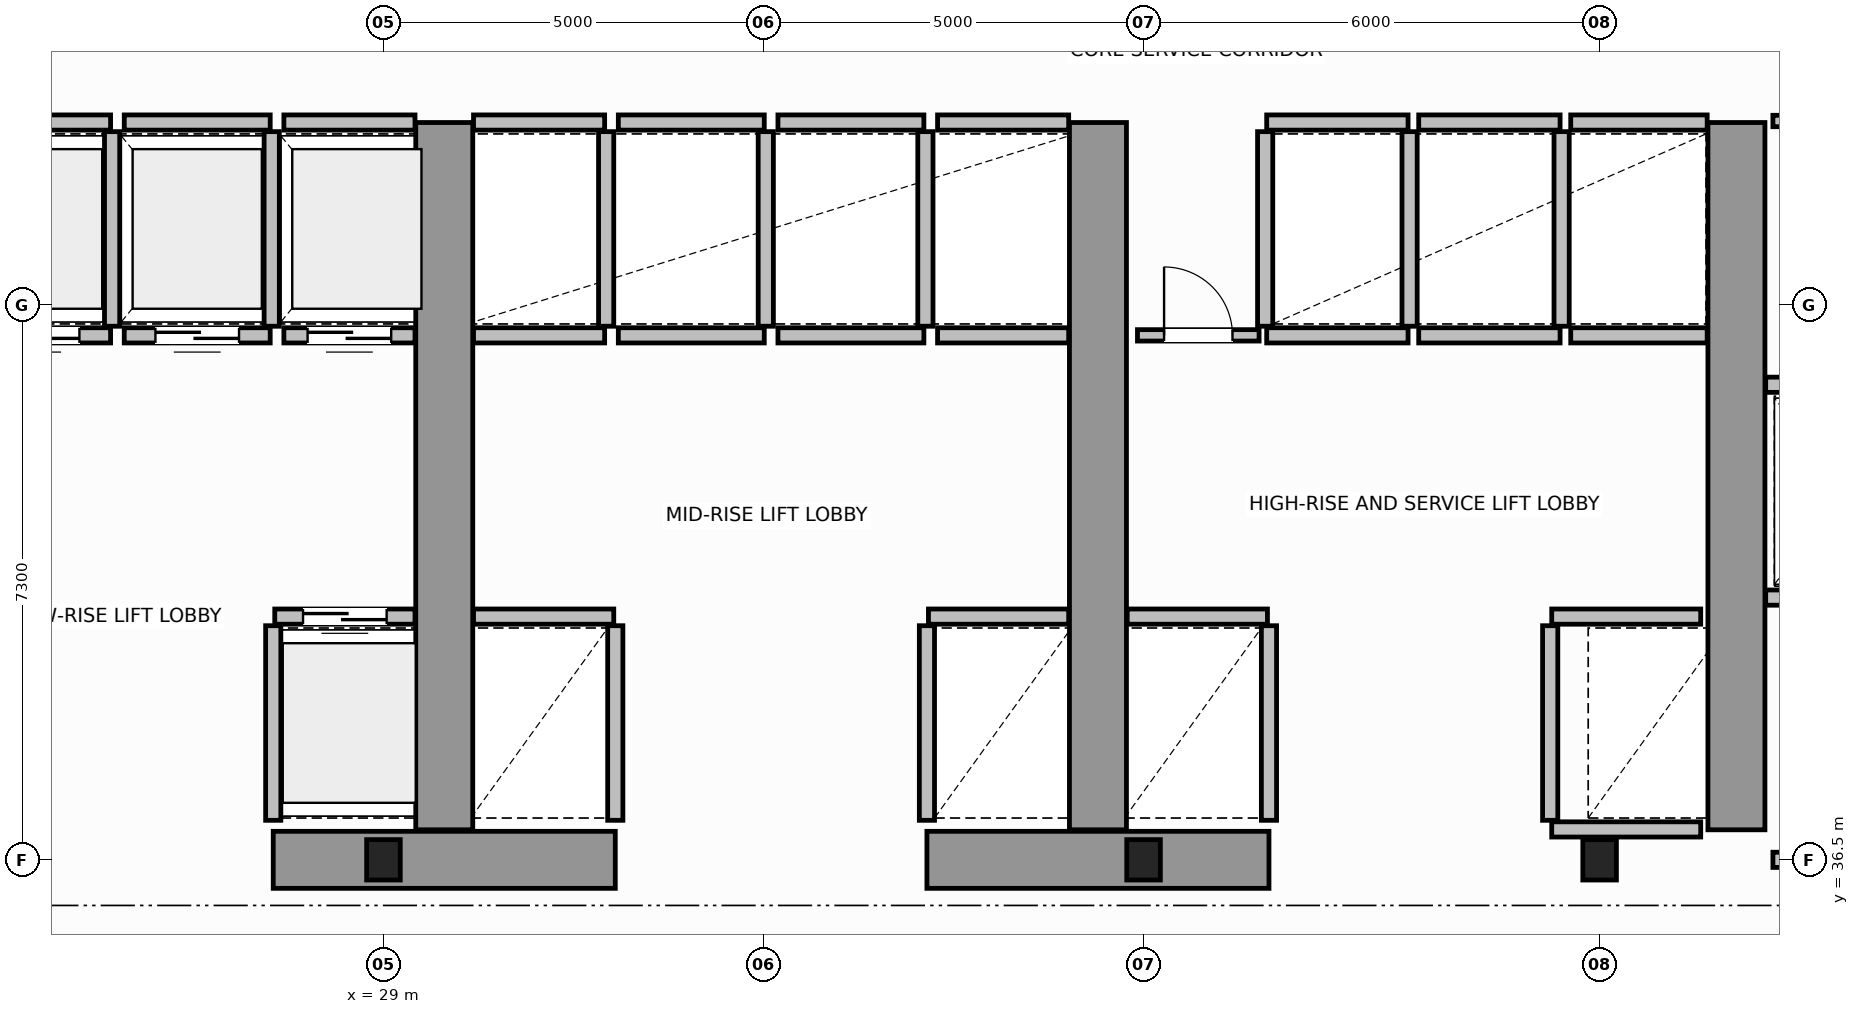
"""IFC4 building model, lengths in metres.
Left out: names, types, materials, properties, quantities, classifications, styles, units other than length and angle.
Written with IfcOpenShell. Run it as: python <this file> out.ifc"""

import sys

from ifc_helpers import new_model, si_unit, direction, frame, frame_2d, origin, origin_2d, place, context, subcontext, project, spatial, rectangle, i_section, extrude, source, transform, mapped, element, fill, save


model = new_model("IFC4")
c1 = context("Model", 3, precision=1e-05, world=origin(), true_north=direction((0.0, 1.0)))
c2 = subcontext(c1, "Body", "Model", "MODEL_VIEW")
j1 = project(units=[si_unit("LENGTHUNIT", "METRE"), si_unit("PLANEANGLEUNIT", "RADIAN")], contexts=[c1])
p1 = place(None, origin())
s1 = spatial("IfcSite", under=j1, at=p1, CompositionType="ELEMENT")
p2 = place(p1, origin())
s2 = spatial("IfcBuilding", under=s1, at=p2, CompositionType="ELEMENT")
p3 = place(p2, frame((0.0, 0.0, 88.2)))
s3 = spatial("IfcBuildingStorey", under=s2, at=p3, CompositionType="ELEMENT", Elevation=88.2)
m1 = source(origin(), c2, "Body", "SweptSolid", [
    extrude(i_section(OverallWidth=0.442, OverallDepth=0.531, WebThickness=0.065, FlangeThickness=0.076, FilletRadius=0.015, at=origin_2d()), origin(), (0.0, 0.0, 1.0), 3.8),
])
for number, where, z_axis, x_axis in (
    (1, (29.0, 36.5, 0.0), (0.0, 0.0, 1.0), (1.0, 0.0, 0.0)),
    (2, (39.0, 36.5, 0.0), (0.0, 0.0, 1.0), (1.0, 0.0, 0.0)),
    (3, (45.0, 36.5, 0.0), (0.0, 0.0, 1.0), (1.0, 0.0, 0.0)),
):
    element("IfcColumn", number, at=place(p3, frame(where, z_axis=z_axis, x_axis=x_axis)), inside=s3, PredefinedType="COLUMN", context=c2, shape_type="MappedRepresentation", body=[
        mapped(m1, transform((0.0, 0.0, 0.0), scale=1.0)),
    ])
for number, where, z_axis, x_axis in (
    (4, (27.55, 36.5, 0.0), (0.0, 0.0, 1.0), (1.0, 0.0, 0.0)),
    (5, (36.15, 36.5, 0.0), (0.0, 0.0, 1.0), (1.0, 0.0, 0.0)),
):
    element("IfcWall", number, at=place(p3, frame(where, z_axis=z_axis, x_axis=x_axis)), inside=s3, PredefinedType="SHEAR", context=c2, shape_type="SweptSolid", body=[
        extrude(rectangle(XDim=4.5, YDim=0.75, at=frame_2d((2.25, 0.0))), origin(), (0.0, 0.0, 1.0), 3.8),
    ])
for number, where, z_axis, x_axis in (
    (6, (29.8, 36.895, 0.0), (0.0, 0.0, 1.0), (0.0, 1.0, 0.0)),
    (7, (38.4, 36.895, 0.0), (0.0, 0.0, 1.0), (0.0, 1.0, 0.0)),
    (8, (46.8, 36.895, 0.0), (0.0, 0.0, 1.0), (0.0, 1.0, 0.0)),
):
    element("IfcWall", number, at=place(p3, frame(where, z_axis=z_axis, x_axis=x_axis)), inside=s3, PredefinedType="SHEAR", context=c2, shape_type="SweptSolid", body=[
        extrude(rectangle(XDim=9.305, YDim=0.75, at=frame_2d((4.652, 0.0))), origin(), (0.0, 0.0, 1.0), 3.8),
    ])
p4 = place(p3, frame((47.28, 36.5, 0.0), z_axis=(0.0, 0.0, 1.0), x_axis=(1.0, 0.0, 0.0)))
e9 = element("IfcWall", 9, at=p4, inside=s3, PredefinedType="SOLIDWALL", context=c2, shape_type="SweptSolid", body=[
    extrude(rectangle(XDim=2.47, YDim=0.2, at=frame_2d((1.235, 0.0))), origin(), (0.0, 0.0, 1.0), 2.37),
])
p5 = place(p4, frame((0.65, 0.0, 0.0)))
e10 = element("IfcOpeningElement", 10, at=p5, cuts=e9, PredefinedType="OPENING", context=c2, shape_type="SweptSolid", body=[
    extrude(rectangle(XDim=1.1, YDim=2.15, at=frame_2d((0.55, 1.075))), frame((0.0, 0.11, 0.0), z_axis=(0.0, -1.0, 0.0), x_axis=(1.0, 0.0, 0.0)), (0.0, 0.0, 1.0), 0.22),
])
p6 = place(p3, frame((27.57, 39.7, 0.0), z_axis=(0.0, 0.0, 1.0), x_axis=(1.0, 0.0, 0.0)))
e11 = element("IfcWall", 11, at=p6, inside=s3, PredefinedType="SOLIDWALL", context=c2, shape_type="SweptSolid", body=[
    extrude(rectangle(XDim=1.845, YDim=0.2, at=frame_2d((0.922, 0.0))), origin(), (0.0, 0.0, 1.0), 3.58),
])
p7 = place(p6, frame((0.372, 0.0, 0.0)))
e12 = element("IfcOpeningElement", 12, at=p7, cuts=e11, PredefinedType="OPENING", context=c2, shape_type="SweptSolid", body=[
    extrude(rectangle(XDim=1.1, YDim=2.15, at=frame_2d((0.55, 1.075))), frame((0.0, 0.11, 0.0), z_axis=(0.0, -1.0, 0.0), x_axis=(1.0, 0.0, 0.0)), (0.0, 0.0, 1.0), 0.22),
])
p8 = place(p3, frame((27.55, 37.02, 0.0), z_axis=(0.0, 0.0, 1.0), x_axis=(0.0, 1.0, 0.0)))
e13 = element("IfcWall", 13, at=p8, inside=s3, PredefinedType="SOLIDWALL", context=c2, shape_type="SweptSolid", body=[
    extrude(rectangle(XDim=2.56, YDim=0.2, at=frame_2d((1.28, 0.0))), origin(), (0.0, 0.0, 1.0), 3.58),
])
p9 = place(p3, frame((23.49, 43.4, 0.0), z_axis=(0.0, 0.0, 1.0), x_axis=(1.0, 0.0, 0.0)))
e14 = element("IfcWall", 14, at=p9, inside=s3, PredefinedType="SOLIDWALL", context=c2, shape_type="SweptSolid", body=[
    extrude(rectangle(XDim=1.92, YDim=0.2, at=frame_2d((0.96, 0.0))), origin(), (0.0, 0.0, 1.0), 3.58),
])
p10 = place(p9, frame((0.41, 0.0, 0.0)))
e15 = element("IfcOpeningElement", 15, at=p10, cuts=e14, PredefinedType="OPENING", context=c2, shape_type="SweptSolid", body=[
    extrude(rectangle(XDim=1.1, YDim=2.15, at=frame_2d((0.55, 1.075))), frame((0.0, 0.11, 0.0), z_axis=(0.0, -1.0, 0.0), x_axis=(1.0, 0.0, 0.0)), (0.0, 0.0, 1.0), 0.22),
])
p11 = place(p3, frame((23.49, 46.2, 0.0), z_axis=(0.0, 0.0, 1.0), x_axis=(1.0, 0.0, 0.0)))
e16 = element("IfcWall", 16, at=p11, inside=s3, PredefinedType="SOLIDWALL", context=c2, shape_type="SweptSolid", body=[
    extrude(rectangle(XDim=1.92, YDim=0.2, at=frame_2d((0.96, 0.0))), origin(), (0.0, 0.0, 1.0), 3.58),
])
p12 = place(p3, frame((25.43, 43.52, 0.0), z_axis=(0.0, 0.0, 1.0), x_axis=(0.0, 1.0, 0.0)))
e17 = element("IfcWall", 17, at=p12, inside=s3, PredefinedType="SOLIDWALL", context=c2, shape_type="SweptSolid", body=[
    extrude(rectangle(XDim=2.56, YDim=0.2, at=frame_2d((1.28, 0.0))), origin(), (0.0, 0.0, 1.0), 3.58),
])
p13 = place(p3, frame((25.59, 43.4, 0.0), z_axis=(0.0, 0.0, 1.0), x_axis=(1.0, 0.0, 0.0)))
e18 = element("IfcWall", 18, at=p13, inside=s3, PredefinedType="SOLIDWALL", context=c2, shape_type="SweptSolid", body=[
    extrude(rectangle(XDim=1.92, YDim=0.2, at=frame_2d((0.96, 0.0))), origin(), (0.0, 0.0, 1.0), 3.58),
])
p14 = place(p13, frame((0.41, 0.0, 0.0)))
e19 = element("IfcOpeningElement", 19, at=p14, cuts=e18, PredefinedType="OPENING", context=c2, shape_type="SweptSolid", body=[
    extrude(rectangle(XDim=1.1, YDim=2.15, at=frame_2d((0.55, 1.075))), frame((0.0, 0.11, 0.0), z_axis=(0.0, -1.0, 0.0), x_axis=(1.0, 0.0, 0.0)), (0.0, 0.0, 1.0), 0.22),
])
p15 = place(p3, frame((25.59, 46.2, 0.0), z_axis=(0.0, 0.0, 1.0), x_axis=(1.0, 0.0, 0.0)))
e20 = element("IfcWall", 20, at=p15, inside=s3, PredefinedType="SOLIDWALL", context=c2, shape_type="SweptSolid", body=[
    extrude(rectangle(XDim=1.92, YDim=0.2, at=frame_2d((0.96, 0.0))), origin(), (0.0, 0.0, 1.0), 3.58),
])
p16 = place(p3, frame((27.53, 43.52, 0.0), z_axis=(0.0, 0.0, 1.0), x_axis=(0.0, 1.0, 0.0)))
e21 = element("IfcWall", 21, at=p16, inside=s3, PredefinedType="SOLIDWALL", context=c2, shape_type="SweptSolid", body=[
    extrude(rectangle(XDim=2.56, YDim=0.2, at=frame_2d((1.28, 0.0))), origin(), (0.0, 0.0, 1.0), 3.58),
])
p17 = place(p3, frame((27.69, 43.4, 0.0), z_axis=(0.0, 0.0, 1.0), x_axis=(1.0, 0.0, 0.0)))
e22 = element("IfcWall", 22, at=p17, inside=s3, PredefinedType="SOLIDWALL", context=c2, shape_type="SweptSolid", body=[
    extrude(rectangle(XDim=1.725, YDim=0.2, at=frame_2d((0.863, 0.0))), origin(), (0.0, 0.0, 1.0), 3.58),
])
p18 = place(p17, frame((0.312, 0.0, 0.0)))
e23 = element("IfcOpeningElement", 23, at=p18, cuts=e22, PredefinedType="OPENING", context=c2, shape_type="SweptSolid", body=[
    extrude(rectangle(XDim=1.1, YDim=2.15, at=frame_2d((0.55, 1.075))), frame((0.0, 0.11, 0.0), z_axis=(0.0, -1.0, 0.0), x_axis=(1.0, 0.0, 0.0)), (0.0, 0.0, 1.0), 0.22),
])
p19 = place(p3, frame((27.69, 46.2, 0.0), z_axis=(0.0, 0.0, 1.0), x_axis=(1.0, 0.0, 0.0)))
e24 = element("IfcWall", 24, at=p19, inside=s3, PredefinedType="SOLIDWALL", context=c2, shape_type="SweptSolid", body=[
    extrude(rectangle(XDim=1.725, YDim=0.2, at=frame_2d((0.863, 0.0))), origin(), (0.0, 0.0, 1.0), 3.58),
])
p20 = place(p3, frame((30.185, 39.7, 0.0), z_axis=(0.0, 0.0, 1.0), x_axis=(1.0, 0.0, 0.0)))
e25 = element("IfcWall", 25, at=p20, inside=s3, PredefinedType="SOLIDWALL", context=c2, shape_type="SweptSolid", body=[
    extrude(rectangle(XDim=1.845, YDim=0.2, at=frame_2d((0.922, 0.0))), origin(), (0.0, 0.0, 1.0), 3.58),
])
p21 = place(p3, frame((32.05, 37.02, 0.0), z_axis=(0.0, 0.0, 1.0), x_axis=(0.0, 1.0, 0.0)))
e26 = element("IfcWall", 26, at=p21, inside=s3, PredefinedType="SOLIDWALL", context=c2, shape_type="SweptSolid", body=[
    extrude(rectangle(XDim=2.56, YDim=0.2, at=frame_2d((1.28, 0.0))), origin(), (0.0, 0.0, 1.0), 3.58),
])
p22 = place(p3, frame((36.17, 39.7, 0.0), z_axis=(0.0, 0.0, 1.0), x_axis=(1.0, 0.0, 0.0)))
e27 = element("IfcWall", 27, at=p22, inside=s3, PredefinedType="SOLIDWALL", context=c2, shape_type="SweptSolid", body=[
    extrude(rectangle(XDim=1.845, YDim=0.2, at=frame_2d((0.922, 0.0))), origin(), (0.0, 0.0, 1.0), 3.58),
])
p23 = place(p3, frame((36.15, 37.02, 0.0), z_axis=(0.0, 0.0, 1.0), x_axis=(0.0, 1.0, 0.0)))
e28 = element("IfcWall", 28, at=p23, inside=s3, PredefinedType="SOLIDWALL", context=c2, shape_type="SweptSolid", body=[
    extrude(rectangle(XDim=2.56, YDim=0.2, at=frame_2d((1.28, 0.0))), origin(), (0.0, 0.0, 1.0), 3.58),
])
for number, where, z_axis, x_axis in (
    (29, (30.185, 43.4, 0.0), (0.0, 0.0, 1.0), (1.0, 0.0, 0.0)),
    (30, (30.185, 46.2, 0.0), (0.0, 0.0, 1.0), (1.0, 0.0, 0.0)),
):
    element("IfcWall", number, at=place(p3, frame(where, z_axis=z_axis, x_axis=x_axis)), inside=s3, PredefinedType="SOLIDWALL", context=c2, shape_type="SweptSolid", body=[
        extrude(rectangle(XDim=1.725, YDim=0.2, at=frame_2d((0.862, 0.0))), origin(), (0.0, 0.0, 1.0), 3.58),
    ])
p24 = place(p3, frame((31.93, 43.52, 0.0), z_axis=(0.0, 0.0, 1.0), x_axis=(0.0, 1.0, 0.0)))
e31 = element("IfcWall", 31, at=p24, inside=s3, PredefinedType="SOLIDWALL", context=c2, shape_type="SweptSolid", body=[
    extrude(rectangle(XDim=2.56, YDim=0.2, at=frame_2d((1.28, 0.0))), origin(), (0.0, 0.0, 1.0), 3.58),
])
for number, where, z_axis, x_axis in (
    (32, (32.09, 43.4, 0.0), (0.0, 0.0, 1.0), (1.0, 0.0, 0.0)),
    (33, (32.09, 46.2, 0.0), (0.0, 0.0, 1.0), (1.0, 0.0, 0.0)),
):
    element("IfcWall", number, at=place(p3, frame(where, z_axis=z_axis, x_axis=x_axis)), inside=s3, PredefinedType="SOLIDWALL", context=c2, shape_type="SweptSolid", body=[
        extrude(rectangle(XDim=1.92, YDim=0.2, at=frame_2d((0.96, 0.0))), origin(), (0.0, 0.0, 1.0), 3.58),
    ])
p25 = place(p3, frame((34.03, 43.52, 0.0), z_axis=(0.0, 0.0, 1.0), x_axis=(0.0, 1.0, 0.0)))
e34 = element("IfcWall", 34, at=p25, inside=s3, PredefinedType="SOLIDWALL", context=c2, shape_type="SweptSolid", body=[
    extrude(rectangle(XDim=2.56, YDim=0.2, at=frame_2d((1.28, 0.0))), origin(), (0.0, 0.0, 1.0), 3.58),
])
for number, where, z_axis, x_axis in (
    (35, (34.19, 43.4, 0.0), (0.0, 0.0, 1.0), (1.0, 0.0, 0.0)),
    (36, (34.19, 46.2, 0.0), (0.0, 0.0, 1.0), (1.0, 0.0, 0.0)),
):
    element("IfcWall", number, at=place(p3, frame(where, z_axis=z_axis, x_axis=x_axis)), inside=s3, PredefinedType="SOLIDWALL", context=c2, shape_type="SweptSolid", body=[
        extrude(rectangle(XDim=1.92, YDim=0.2, at=frame_2d((0.96, 0.0))), origin(), (0.0, 0.0, 1.0), 3.58),
    ])
p26 = place(p3, frame((36.13, 43.52, 0.0), z_axis=(0.0, 0.0, 1.0), x_axis=(0.0, 1.0, 0.0)))
e37 = element("IfcWall", 37, at=p26, inside=s3, PredefinedType="SOLIDWALL", context=c2, shape_type="SweptSolid", body=[
    extrude(rectangle(XDim=2.56, YDim=0.2, at=frame_2d((1.28, 0.0))), origin(), (0.0, 0.0, 1.0), 3.58),
])
for number, where, z_axis, x_axis in (
    (38, (36.29, 43.4, 0.0), (0.0, 0.0, 1.0), (1.0, 0.0, 0.0)),
    (39, (36.29, 46.2, 0.0), (0.0, 0.0, 1.0), (1.0, 0.0, 0.0)),
):
    element("IfcWall", number, at=place(p3, frame(where, z_axis=z_axis, x_axis=x_axis)), inside=s3, PredefinedType="SOLIDWALL", context=c2, shape_type="SweptSolid", body=[
        extrude(rectangle(XDim=1.725, YDim=0.2, at=frame_2d((0.862, 0.0))), origin(), (0.0, 0.0, 1.0), 3.58),
    ])
p27 = place(p3, frame((38.785, 39.7, 0.0), z_axis=(0.0, 0.0, 1.0), x_axis=(1.0, 0.0, 0.0)))
e40 = element("IfcWall", 40, at=p27, inside=s3, PredefinedType="SOLIDWALL", context=c2, shape_type="SweptSolid", body=[
    extrude(rectangle(XDim=1.845, YDim=0.2, at=frame_2d((0.922, 0.0))), origin(), (0.0, 0.0, 1.0), 3.58),
])
p28 = place(p3, frame((40.65, 37.02, 0.0), z_axis=(0.0, 0.0, 1.0), x_axis=(0.0, 1.0, 0.0)))
e41 = element("IfcWall", 41, at=p28, inside=s3, PredefinedType="SOLIDWALL", context=c2, shape_type="SweptSolid", body=[
    extrude(rectangle(XDim=2.56, YDim=0.2, at=frame_2d((1.28, 0.0))), origin(), (0.0, 0.0, 1.0), 3.58),
])
p29 = place(p3, frame((44.37, 39.7, 0.0), z_axis=(0.0, 0.0, 1.0), x_axis=(1.0, 0.0, 0.0)))
e42 = element("IfcWall", 42, at=p29, inside=s3, PredefinedType="SOLIDWALL", context=c2, shape_type="SweptSolid", body=[
    extrude(rectangle(XDim=1.96, YDim=0.2, at=frame_2d((0.98, 0.0))), origin(), (0.0, 0.0, 1.0), 3.58),
])
p30 = place(p3, frame((44.37, 36.9, 0.0), z_axis=(0.0, 0.0, 1.0), x_axis=(1.0, 0.0, 0.0)))
e43 = element("IfcWall", 43, at=p30, inside=s3, PredefinedType="SOLIDWALL", context=c2, shape_type="SweptSolid", body=[
    extrude(rectangle(XDim=1.96, YDim=0.2, at=frame_2d((0.98, 0.0))), origin(), (0.0, 0.0, 1.0), 2.37),
])
p31 = place(p3, frame((44.35, 37.02, 0.0), z_axis=(0.0, 0.0, 1.0), x_axis=(0.0, 1.0, 0.0)))
e44 = element("IfcWall", 44, at=p31, inside=s3, PredefinedType="SOLIDWALL", context=c2, shape_type="SweptSolid", body=[
    extrude(rectangle(XDim=2.56, YDim=0.2, at=frame_2d((1.28, 0.0))), origin(), (0.0, 0.0, 1.0), 3.58),
])
for number, where, z_axis, x_axis in (
    (45, (40.62, 43.4, 0.0), (0.0, 0.0, 1.0), (1.0, 0.0, 0.0)),
    (46, (40.62, 46.2, 0.0), (0.0, 0.0, 1.0), (1.0, 0.0, 0.0)),
):
    element("IfcWall", number, at=place(p3, frame(where, z_axis=z_axis, x_axis=x_axis)), inside=s3, PredefinedType="SOLIDWALL", context=c2, shape_type="SweptSolid", body=[
        extrude(rectangle(XDim=1.86, YDim=0.2, at=frame_2d((0.93, 0.0))), origin(), (0.0, 0.0, 1.0), 3.58),
    ])
for number, where, z_axis, x_axis in (
    (47, (40.6, 43.52, 0.0), (0.0, 0.0, 1.0), (0.0, 1.0, 0.0)),
    (48, (42.5, 43.52, 0.0), (0.0, 0.0, 1.0), (0.0, 1.0, 0.0)),
):
    element("IfcWall", number, at=place(p3, frame(where, z_axis=z_axis, x_axis=x_axis)), inside=s3, PredefinedType="SOLIDWALL", context=c2, shape_type="SweptSolid", body=[
        extrude(rectangle(XDim=2.56, YDim=0.2, at=frame_2d((1.28, 0.0))), origin(), (0.0, 0.0, 1.0), 3.58),
    ])
for number, where, z_axis, x_axis in (
    (49, (42.62, 43.4, 0.0), (0.0, 0.0, 1.0), (1.0, 0.0, 0.0)),
    (50, (42.62, 46.2, 0.0), (0.0, 0.0, 1.0), (1.0, 0.0, 0.0)),
):
    element("IfcWall", number, at=place(p3, frame(where, z_axis=z_axis, x_axis=x_axis)), inside=s3, PredefinedType="SOLIDWALL", context=c2, shape_type="SweptSolid", body=[
        extrude(rectangle(XDim=1.86, YDim=0.2, at=frame_2d((0.93, 0.0))), origin(), (0.0, 0.0, 1.0), 3.58),
    ])
p32 = place(p3, frame((44.5, 43.52, 0.0), z_axis=(0.0, 0.0, 1.0), x_axis=(0.0, 1.0, 0.0)))
e51 = element("IfcWall", 51, at=p32, inside=s3, PredefinedType="SOLIDWALL", context=c2, shape_type="SweptSolid", body=[
    extrude(rectangle(XDim=2.56, YDim=0.2, at=frame_2d((1.28, 0.0))), origin(), (0.0, 0.0, 1.0), 3.58),
])
for number, where, z_axis, x_axis in (
    (52, (44.62, 43.4, 0.0), (0.0, 0.0, 1.0), (1.0, 0.0, 0.0)),
    (53, (44.62, 46.2, 0.0), (0.0, 0.0, 1.0), (1.0, 0.0, 0.0)),
):
    element("IfcWall", number, at=place(p3, frame(where, z_axis=z_axis, x_axis=x_axis)), inside=s3, PredefinedType="SOLIDWALL", context=c2, shape_type="SweptSolid", body=[
        extrude(rectangle(XDim=1.795, YDim=0.2, at=frame_2d((0.897, 0.0))), origin(), (0.0, 0.0, 1.0), 3.58),
    ])
p33 = place(p3, frame((47.185, 39.95, 0.0), z_axis=(0.0, 0.0, 1.0), x_axis=(1.0, 0.0, 0.0)))
e54 = element("IfcWall", 54, at=p33, inside=s3, PredefinedType="SOLIDWALL", context=c2, shape_type="SweptSolid", body=[
    extrude(rectangle(XDim=2.145, YDim=0.2, at=frame_2d((1.073, 0.0))), origin(), (0.0, 0.0, 1.0), 3.58),
])
p34 = place(p33, frame((0.522, 0.0, 0.0)))
e55 = element("IfcOpeningElement", 55, at=p34, cuts=e54, PredefinedType="OPENING", context=c2, shape_type="SweptSolid", body=[
    extrude(rectangle(XDim=1.1, YDim=2.15, at=frame_2d((0.55, 1.075))), frame((0.0, 0.11, 0.0), z_axis=(0.0, -1.0, 0.0), x_axis=(1.0, 0.0, 0.0)), (0.0, 0.0, 1.0), 0.22),
])
p35 = place(p3, frame((47.185, 42.75, 0.0), z_axis=(0.0, 0.0, 1.0), x_axis=(1.0, 0.0, 0.0)))
e56 = element("IfcWall", 56, at=p35, inside=s3, PredefinedType="SOLIDWALL", context=c2, shape_type="SweptSolid", body=[
    extrude(rectangle(XDim=2.145, YDim=0.2, at=frame_2d((1.073, 0.0))), origin(), (0.0, 0.0, 1.0), 3.58),
])
p36 = place(p3, frame((47.28, 46.22, 0.0), z_axis=(0.0, 0.0, 1.0), x_axis=(1.0, 0.0, 0.0)))
e57 = element("IfcWall", 57, at=p36, inside=s3, PredefinedType="PARTITIONING", context=c2, shape_type="SweptSolid", body=[
    extrude(rectangle(XDim=2.1, YDim=0.15, at=frame_2d((1.05, 0.0))), origin(), (0.0, 0.0, 1.0), 3.58),
])
p37 = place(p36, frame((0.55, 0.0, 0.0)))
e58 = element("IfcOpeningElement", 58, at=p37, cuts=e57, PredefinedType="OPENING", context=c2, shape_type="SweptSolid", body=[
    extrude(rectangle(XDim=0.9, YDim=2.1, at=frame_2d((0.45, 1.05))), frame((0.0, 0.085, 0.0), z_axis=(0.0, -1.0, 0.0), x_axis=(1.0, 0.0, 0.0)), (0.0, 0.0, 1.0), 0.17),
])
p38 = place(p3, frame((38.92, 43.4, 0.0), z_axis=(0.0, 0.0, 1.0), x_axis=(1.0, 0.0, 0.0)))
e59 = element("IfcWall", 59, at=p38, inside=s3, PredefinedType="PARTITIONING", context=c2, shape_type="SweptSolid", body=[
    extrude(rectangle(XDim=1.6, YDim=0.15, at=frame_2d((0.8, 0.0))), origin(), (0.0, 0.0, 1.0), 3.58),
])
p39 = place(p38, frame((0.35, 0.0, 0.0)))
e60 = element("IfcOpeningElement", 60, at=p39, cuts=e59, PredefinedType="OPENING", context=c2, shape_type="SweptSolid", body=[
    extrude(rectangle(XDim=0.9, YDim=2.1, at=frame_2d((0.45, 1.05))), frame((0.0, 0.085, 0.0), z_axis=(0.0, -1.0, 0.0), x_axis=(1.0, 0.0, 0.0)), (0.0, 0.0, 1.0), 0.17),
])
m2 = source(origin(), c2, "Body", "SweptSolid", [
    extrude(rectangle(XDim=1.1, YDim=2.15, at=frame_2d((0.55, 1.075))), frame((0.0, 0.025, 0.0), z_axis=(0.0, -1.0, 0.0), x_axis=(1.0, 0.0, 0.0)), (0.0, 0.0, 1.0), 0.05),
])
p40 = place(p7, origin())
e61 = element("IfcDoor", 61, at=p40, inside=s3, OperationType="DOUBLE_DOOR_SLIDING", PredefinedType="DOOR", context=c2, shape_type="MappedRepresentation", body=[
    mapped(m2, transform((0.0, 0.0, 0.0), scale=1.0)),
])
fill(e12, e61)
p41 = place(p10, origin())
e62 = element("IfcDoor", 62, at=p41, inside=s3, OperationType="DOUBLE_DOOR_SLIDING", PredefinedType="DOOR", context=c2, shape_type="MappedRepresentation", body=[
    mapped(m2, transform((0.0, 0.0, 0.0), scale=1.0)),
])
fill(e15, e62)
p42 = place(p14, origin())
e63 = element("IfcDoor", 63, at=p42, inside=s3, OperationType="DOUBLE_DOOR_SLIDING", PredefinedType="DOOR", context=c2, shape_type="MappedRepresentation", body=[
    mapped(m2, transform((0.0, 0.0, 0.0), scale=1.0)),
])
fill(e19, e63)
p43 = place(p18, origin())
e64 = element("IfcDoor", 64, at=p43, inside=s3, OperationType="DOUBLE_DOOR_SLIDING", PredefinedType="DOOR", context=c2, shape_type="MappedRepresentation", body=[
    mapped(m2, transform((0.0, 0.0, 0.0), scale=1.0)),
])
fill(e23, e64)
m3 = source(origin(), c2, "Body", "SweptSolid", [
    extrude(rectangle(XDim=0.9, YDim=2.1, at=frame_2d((0.45, 1.05))), frame((0.0, 0.025, 0.0), z_axis=(0.0, -1.0, 0.0), x_axis=(1.0, 0.0, 0.0)), (0.0, 0.0, 1.0), 0.05),
])
p44 = place(p39, origin())
e65 = element("IfcDoor", 65, at=p44, inside=s3, OperationType="SINGLE_SWING_LEFT", PredefinedType="DOOR", context=c2, shape_type="MappedRepresentation", body=[
    mapped(m3, transform((0.0, 0.0, 0.0), scale=1.0)),
])
fill(e60, e65)
save(model, sys.argv[1])
